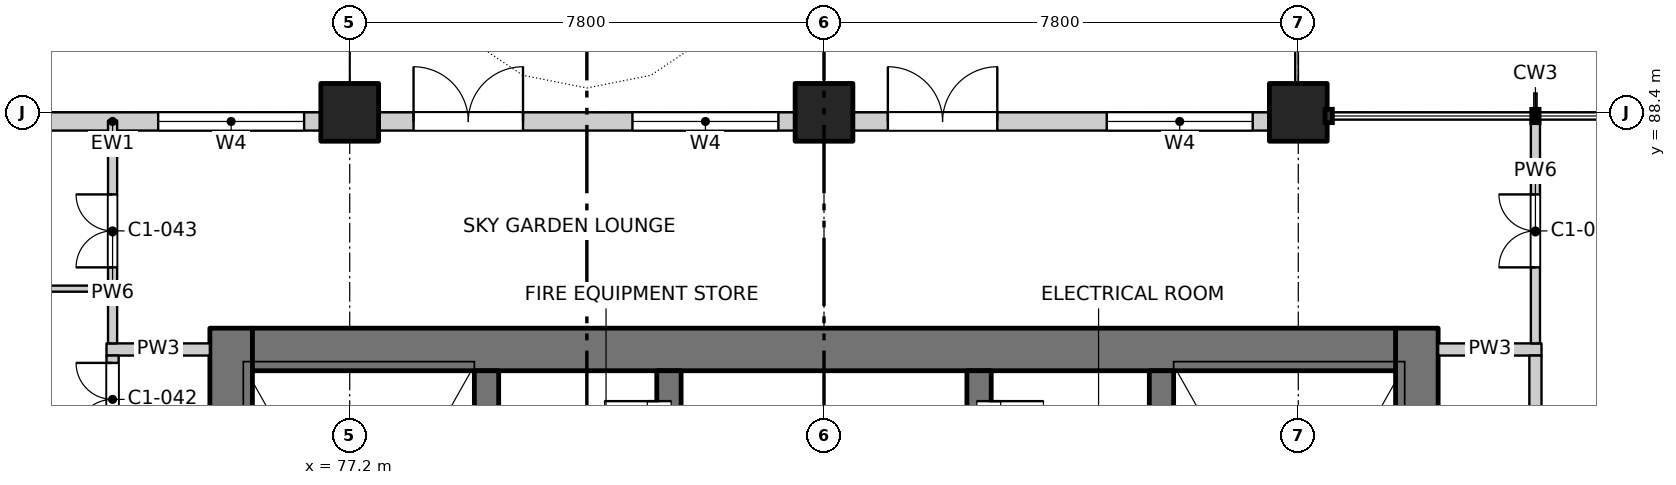
"""IFC4 building model, lengths in metres.
Left out: names, types, materials, properties, quantities, classifications, styles, units other than length and angle.
Written with IfcOpenShell. Run it as: python <this file> out.ifc"""

import sys

from ifc_helpers import new_model, si_unit, direction, frame, frame_2d, origin, origin_2d, place, context, subcontext, project, spatial, rectangle, extrude, element, fill, save


model = new_model("IFC4")
c1 = context("Model", 3, precision=1e-05, world=origin(), true_north=direction((0.0, 1.0)))
c2 = subcontext(c1, "Body", "Model", "MODEL_VIEW")
j1 = project(units=[si_unit("LENGTHUNIT", "METRE"), si_unit("PLANEANGLEUNIT", "RADIAN")], contexts=[c1])
p1 = place(None, origin())
s1 = spatial("IfcSite", under=j1, at=p1, CompositionType="ELEMENT")
p2 = place(p1, origin())
s2 = spatial("IfcBuilding", under=s1, at=p2, CompositionType="ELEMENT")
p3 = place(p2, frame((0.0, 0.0, 71.6)))
s3 = spatial("IfcBuildingStorey", under=s2, at=p3, CompositionType="ELEMENT", Elevation=71.6)
for number, where, z_axis, x_axis in (
    (1, (77.2, 88.4, -0.25), (0.0, 0.0, 1.0), (1.0, 0.0, 0.0)),
    (2, (85.0, 88.4, -0.25), (0.0, 0.0, 1.0), (1.0, 0.0, 0.0)),
    (3, (92.8, 88.4, -0.25), (0.0, 0.0, 1.0), (1.0, 0.0, 0.0)),
):
    element("IfcColumn", number, at=place(p3, frame(where, z_axis=z_axis, x_axis=x_axis)), inside=s3, PredefinedType="COLUMN", context=c2, shape_type="SweptSolid", body=[
        extrude(rectangle(XDim=0.95, YDim=0.95, at=origin_2d()), origin(), (0.0, 0.0, 1.0), 3.4),
    ])
p4 = place(p3, frame((75.25, 77.3, -0.25), z_axis=(0.0, 0.0, 1.0), x_axis=(0.0, 1.0, 0.0)))
e4 = element("IfcWall", 4, at=p4, inside=s3, PredefinedType="SOLIDWALL", context=c2, shape_type="SweptSolid", body=[
    extrude(rectangle(XDim=7.55, YDim=0.7, at=frame_2d((3.775, 0.0))), origin(), (0.0, 0.0, 1.0), 3.4),
])
p5 = place(p4, frame((0.3, 0.0, 0.25)))
e5 = element("IfcOpeningElement", 5, at=p5, cuts=e4, PredefinedType="OPENING", context=c2, shape_type="SweptSolid", body=[
    extrude(rectangle(XDim=1.2, YDim=2.1, at=frame_2d((0.6, 1.05))), frame((0.0, 0.36, 0.0), z_axis=(0.0, -1.0, 0.0), x_axis=(1.0, 0.0, 0.0)), (0.0, 0.0, 1.0), 0.72),
])
p6 = place(p3, frame((94.75, 77.3, -0.25), z_axis=(0.0, 0.0, 1.0), x_axis=(0.0, 1.0, 0.0)))
e6 = element("IfcWall", 6, at=p6, inside=s3, PredefinedType="SOLIDWALL", context=c2, shape_type="SweptSolid", body=[
    extrude(rectangle(XDim=7.55, YDim=0.7, at=frame_2d((3.775, 0.0))), origin(), (0.0, 0.0, 1.0), 3.4),
])
p7 = place(p6, frame((0.3, 0.0, 0.25)))
e7 = element("IfcOpeningElement", 7, at=p7, cuts=e6, PredefinedType="OPENING", context=c2, shape_type="SweptSolid", body=[
    extrude(rectangle(XDim=1.2, YDim=2.1, at=frame_2d((0.6, 1.05))), frame((0.0, 0.36, 0.0), z_axis=(0.0, -1.0, 0.0), x_axis=(1.0, 0.0, 0.0)), (0.0, 0.0, 1.0), 0.72),
])
p8 = place(p3, frame((75.6, 84.5, -0.25), z_axis=(0.0, 0.0, 1.0), x_axis=(1.0, 0.0, 0.0)))
e8 = element("IfcWall", 8, at=p8, inside=s3, PredefinedType="SOLIDWALL", context=c2, shape_type="SweptSolid", body=[
    extrude(rectangle(XDim=18.8, YDim=0.7, at=frame_2d((9.4, 0.0))), origin(), (0.0, 0.0, 1.0), 3.4),
])
for number, where, z_axis, x_axis in (
    (9, (79.45, 77.3, -0.25), (0.0, 0.0, 1.0), (0.0, 1.0, 0.0)),
    (10, (90.55, 77.3, -0.25), (0.0, 0.0, 1.0), (0.0, 1.0, 0.0)),
):
    element("IfcWall", number, at=place(p3, frame(where, z_axis=z_axis, x_axis=x_axis)), inside=s3, PredefinedType="SOLIDWALL", context=c2, shape_type="SweptSolid", body=[
        extrude(rectangle(XDim=6.85, YDim=0.4, at=frame_2d((3.425, 0.0))), origin(), (0.0, 0.0, 1.0), 3.4),
    ])
p9 = place(p3, frame((82.45, 82.1, -0.25), z_axis=(0.0, 0.0, 1.0), x_axis=(0.0, 1.0, 0.0)))
e11 = element("IfcWall", 11, at=p9, inside=s3, PredefinedType="SOLIDWALL", context=c2, shape_type="SweptSolid", body=[
    extrude(rectangle(XDim=2.05, YDim=0.4, at=frame_2d((1.025, 0.0))), origin(), (0.0, 0.0, 1.0), 3.4),
])
p10 = place(p9, frame((0.65, 0.0, 0.25)))
e12 = element("IfcOpeningElement", 12, at=p10, cuts=e11, PredefinedType="OPENING", context=c2, shape_type="SweptSolid", body=[
    extrude(rectangle(XDim=0.9, YDim=2.1, at=frame_2d((0.45, 1.05))), frame((0.0, 0.21, 0.0), z_axis=(0.0, -1.0, 0.0), x_axis=(1.0, 0.0, 0.0)), (0.0, 0.0, 1.0), 0.42),
])
p11 = place(p3, frame((87.55, 82.1, -0.25), z_axis=(0.0, 0.0, 1.0), x_axis=(0.0, 1.0, 0.0)))
e13 = element("IfcWall", 13, at=p11, inside=s3, PredefinedType="SOLIDWALL", context=c2, shape_type="SweptSolid", body=[
    extrude(rectangle(XDim=2.05, YDim=0.4, at=frame_2d((1.025, 0.0))), origin(), (0.0, 0.0, 1.0), 3.4),
])
p12 = place(p11, frame((0.65, 0.0, 0.25)))
e14 = element("IfcOpeningElement", 14, at=p12, cuts=e13, PredefinedType="OPENING", context=c2, shape_type="SweptSolid", body=[
    extrude(rectangle(XDim=0.9, YDim=2.1, at=frame_2d((0.45, 1.05))), frame((0.0, 0.21, 0.0), z_axis=(0.0, -1.0, 0.0), x_axis=(1.0, 0.0, 0.0)), (0.0, 0.0, 1.0), 0.42),
])
p13 = place(p3, frame((69.875, 88.25, 0.0), z_axis=(0.0, 0.0, 1.0), x_axis=(1.0, 0.0, 0.0)))
e15 = element("IfcWall", 15, at=p13, inside=s3, PredefinedType="SOLIDWALL", context=c2, shape_type="SweptSolid", body=[
    extrude(rectangle(XDim=6.85, YDim=0.3, at=frame_2d((3.425, 0.0))), origin(), (0.0, 0.0, 1.0), 2.7),
])
p14 = place(p13, frame((0.575, 0.0, 0.0)))
e16 = element("IfcOpeningElement", 16, at=p14, cuts=e15, PredefinedType="OPENING", context=c2, shape_type="SweptSolid", body=[
    extrude(rectangle(XDim=1.8, YDim=2.4, at=frame_2d((0.9, 1.2))), frame((0.0, 0.16, 0.0), z_axis=(0.0, -1.0, 0.0), x_axis=(1.0, 0.0, 0.0)), (0.0, 0.0, 1.0), 0.32),
])
p15 = place(p13, frame((4.175, 0.0, 0.6)))
e17 = element("IfcOpeningElement", 17, at=p15, cuts=e15, PredefinedType="OPENING", context=c2, shape_type="SweptSolid", body=[
    extrude(rectangle(XDim=2.4, YDim=2.1, at=frame_2d((1.2, 1.05))), frame((0.0, 0.16, 0.0), z_axis=(0.0, -1.0, 0.0), x_axis=(1.0, 0.0, 0.0)), (0.0, 0.0, 1.0), 0.32),
])
p16 = place(p3, frame((77.675, 88.25, 0.0), z_axis=(0.0, 0.0, 1.0), x_axis=(1.0, 0.0, 0.0)))
e18 = element("IfcWall", 18, at=p16, inside=s3, PredefinedType="SOLIDWALL", context=c2, shape_type="SweptSolid", body=[
    extrude(rectangle(XDim=6.85, YDim=0.3, at=frame_2d((3.425, 0.0))), origin(), (0.0, 0.0, 1.0), 2.7),
])
p17 = place(p16, frame((0.575, 0.0, 0.0)))
e19 = element("IfcOpeningElement", 19, at=p17, cuts=e18, PredefinedType="OPENING", context=c2, shape_type="SweptSolid", body=[
    extrude(rectangle(XDim=1.8, YDim=2.4, at=frame_2d((0.9, 1.2))), frame((0.0, 0.16, 0.0), z_axis=(0.0, -1.0, 0.0), x_axis=(1.0, 0.0, 0.0)), (0.0, 0.0, 1.0), 0.32),
])
p18 = place(p16, frame((4.175, 0.0, 0.6)))
e20 = element("IfcOpeningElement", 20, at=p18, cuts=e18, PredefinedType="OPENING", context=c2, shape_type="SweptSolid", body=[
    extrude(rectangle(XDim=2.4, YDim=2.1, at=frame_2d((1.2, 1.05))), frame((0.0, 0.16, 0.0), z_axis=(0.0, -1.0, 0.0), x_axis=(1.0, 0.0, 0.0)), (0.0, 0.0, 1.0), 0.32),
])
p19 = place(p3, frame((85.475, 88.25, 0.0), z_axis=(0.0, 0.0, 1.0), x_axis=(1.0, 0.0, 0.0)))
e21 = element("IfcWall", 21, at=p19, inside=s3, PredefinedType="SOLIDWALL", context=c2, shape_type="SweptSolid", body=[
    extrude(rectangle(XDim=6.85, YDim=0.3, at=frame_2d((3.425, 0.0))), origin(), (0.0, 0.0, 1.0), 2.7),
])
p20 = place(p19, frame((0.575, 0.0, 0.0)))
e22 = element("IfcOpeningElement", 22, at=p20, cuts=e21, PredefinedType="OPENING", context=c2, shape_type="SweptSolid", body=[
    extrude(rectangle(XDim=1.8, YDim=2.4, at=frame_2d((0.9, 1.2))), frame((0.0, 0.16, 0.0), z_axis=(0.0, -1.0, 0.0), x_axis=(1.0, 0.0, 0.0)), (0.0, 0.0, 1.0), 0.32),
])
p21 = place(p19, frame((4.175, 0.0, 0.6)))
e23 = element("IfcOpeningElement", 23, at=p21, cuts=e21, PredefinedType="OPENING", context=c2, shape_type="SweptSolid", body=[
    extrude(rectangle(XDim=2.4, YDim=2.1, at=frame_2d((1.2, 1.05))), frame((0.0, 0.16, 0.0), z_axis=(0.0, -1.0, 0.0), x_axis=(1.0, 0.0, 0.0)), (0.0, 0.0, 1.0), 0.32),
])
for number, where, z_axis, x_axis in (
    (24, (73.2, 84.5, 0.0), (0.0, 0.0, 1.0), (1.0, 0.0, 0.0)),
    (25, (95.1, 84.5, 0.0), (0.0, 0.0, 1.0), (1.0, 0.0, 0.0)),
):
    element("IfcWall", number, at=place(p3, frame(where, z_axis=z_axis, x_axis=x_axis)), inside=s3, PredefinedType="PARTITIONING", context=c2, shape_type="SweptSolid", body=[
        extrude(rectangle(XDim=1.7, YDim=0.2, at=frame_2d((0.85, 0.0))), origin(), (0.0, 0.0, 1.0), 3.15),
    ])
p22 = place(p3, frame((62.51, 85.5, 0.0), z_axis=(0.0, 0.0, 1.0), x_axis=(1.0, 0.0, 0.0)))
e26 = element("IfcWall", 26, at=p22, inside=s3, PredefinedType="PARTITIONING", context=c2, shape_type="SweptSolid", body=[
    extrude(rectangle(XDim=10.865, YDim=0.1, at=frame_2d((5.433, 0.0))), origin(), (0.0, 0.0, 1.0), 3.15),
])
p23 = place(p3, frame((73.3, 49.5, 0.0), z_axis=(0.0, 0.0, 1.0), x_axis=(0.0, 1.0, 0.0)))
e27 = element("IfcWall", 27, at=p23, inside=s3, PredefinedType="PARTITIONING", context=c2, shape_type="SweptSolid", body=[
    extrude(rectangle(XDim=34.9, YDim=0.2, at=frame_2d((17.45, 0.0))), origin(), (0.0, 0.0, 1.0), 3.15),
])
p24 = place(p23, frame((6.2, 0.0, 0.0)))
e28 = element("IfcOpeningElement", 28, at=p24, cuts=e27, PredefinedType="OPENING", context=c2, shape_type="SweptSolid", body=[
    extrude(rectangle(XDim=1.2, YDim=2.1, at=frame_2d((0.6, 1.05))), frame((0.0, 0.11, 0.0), z_axis=(0.0, -1.0, 0.0), x_axis=(1.0, 0.0, 0.0)), (0.0, 0.0, 1.0), 0.22),
])
p25 = place(p23, frame((9.05, 0.0, 0.0)))
e29 = element("IfcOpeningElement", 29, at=p25, cuts=e27, PredefinedType="OPENING", context=c2, shape_type="SweptSolid", body=[
    extrude(rectangle(XDim=1.2, YDim=2.1, at=frame_2d((0.6, 1.05))), frame((0.0, 0.11, 0.0), z_axis=(0.0, -1.0, 0.0), x_axis=(1.0, 0.0, 0.0)), (0.0, 0.0, 1.0), 0.22),
])
p26 = place(p23, frame((24.65, 0.0, 0.0)))
e30 = element("IfcOpeningElement", 30, at=p26, cuts=e27, PredefinedType="OPENING", context=c2, shape_type="SweptSolid", body=[
    extrude(rectangle(XDim=1.2, YDim=2.1, at=frame_2d((0.6, 1.05))), frame((0.0, 0.11, 0.0), z_axis=(0.0, -1.0, 0.0), x_axis=(1.0, 0.0, 0.0)), (0.0, 0.0, 1.0), 0.22),
])
p27 = place(p23, frame((33.579, 0.0, 0.0)))
e31 = element("IfcOpeningElement", 31, at=p27, cuts=e27, PredefinedType="OPENING", context=c2, shape_type="SweptSolid", body=[
    extrude(rectangle(XDim=1.2, YDim=2.1, at=frame_2d((0.6, 1.05))), frame((0.0, 0.11, 0.0), z_axis=(0.0, -1.0, 0.0), x_axis=(1.0, 0.0, 0.0)), (0.0, 0.0, 1.0), 0.22),
])
p28 = place(p3, frame((73.3, 84.6, 0.0), z_axis=(0.0, 0.0, 1.0), x_axis=(0.0, 1.0, 0.0)))
e32 = element("IfcWall", 32, at=p28, inside=s3, PredefinedType="PARTITIONING", context=c2, shape_type="SweptSolid", body=[
    extrude(rectangle(XDim=3.665, YDim=0.15, at=frame_2d((1.833, 0.0))), origin(), (0.0, 0.0, 1.0), 3.15),
])
p29 = place(p28, frame((1.25, 0.0, 0.0)))
e33 = element("IfcOpeningElement", 33, at=p29, cuts=e32, PredefinedType="OPENING", context=c2, shape_type="SweptSolid", body=[
    extrude(rectangle(XDim=1.2, YDim=2.1, at=frame_2d((0.6, 1.05))), frame((0.0, 0.085, 0.0), z_axis=(0.0, -1.0, 0.0), x_axis=(1.0, 0.0, 0.0)), (0.0, 0.0, 1.0), 0.17),
])
p30 = place(p3, frame((96.7, 49.5, 0.0), z_axis=(0.0, 0.0, 1.0), x_axis=(0.0, 1.0, 0.0)))
e34 = element("IfcWall", 34, at=p30, inside=s3, PredefinedType="PARTITIONING", context=c2, shape_type="SweptSolid", body=[
    extrude(rectangle(XDim=34.9, YDim=0.2, at=frame_2d((17.45, 0.0))), origin(), (0.0, 0.0, 1.0), 3.15),
])
p31 = place(p30, frame((6.2, 0.0, 0.0)))
e35 = element("IfcOpeningElement", 35, at=p31, cuts=e34, PredefinedType="OPENING", context=c2, shape_type="SweptSolid", body=[
    extrude(rectangle(XDim=1.2, YDim=2.1, at=frame_2d((0.6, 1.05))), frame((0.0, 0.11, 0.0), z_axis=(0.0, -1.0, 0.0), x_axis=(1.0, 0.0, 0.0)), (0.0, 0.0, 1.0), 0.22),
])
p32 = place(p30, frame((12.95, 0.0, 0.0)))
e36 = element("IfcOpeningElement", 36, at=p32, cuts=e34, PredefinedType="OPENING", context=c2, shape_type="SweptSolid", body=[
    extrude(rectangle(XDim=1.2, YDim=2.1, at=frame_2d((0.6, 1.05))), frame((0.0, 0.11, 0.0), z_axis=(0.0, -1.0, 0.0), x_axis=(1.0, 0.0, 0.0)), (0.0, 0.0, 1.0), 0.22),
])
p33 = place(p30, frame((20.75, 0.0, 0.0)))
e37 = element("IfcOpeningElement", 37, at=p33, cuts=e34, PredefinedType="OPENING", context=c2, shape_type="SweptSolid", body=[
    extrude(rectangle(XDim=1.2, YDim=2.1, at=frame_2d((0.6, 1.05))), frame((0.0, 0.11, 0.0), z_axis=(0.0, -1.0, 0.0), x_axis=(1.0, 0.0, 0.0)), (0.0, 0.0, 1.0), 0.22),
])
p34 = place(p30, frame((28.55, 0.0, 0.0)))
e38 = element("IfcOpeningElement", 38, at=p34, cuts=e34, PredefinedType="OPENING", context=c2, shape_type="SweptSolid", body=[
    extrude(rectangle(XDim=1.2, YDim=2.1, at=frame_2d((0.6, 1.05))), frame((0.0, 0.11, 0.0), z_axis=(0.0, -1.0, 0.0), x_axis=(1.0, 0.0, 0.0)), (0.0, 0.0, 1.0), 0.22),
])
p35 = place(p3, frame((96.7, 84.6, 0.0), z_axis=(0.0, 0.0, 1.0), x_axis=(0.0, 1.0, 0.0)))
e39 = element("IfcWall", 39, at=p35, inside=s3, PredefinedType="PARTITIONING", context=c2, shape_type="SweptSolid", body=[
    extrude(rectangle(XDim=3.665, YDim=0.15, at=frame_2d((1.833, 0.0))), origin(), (0.0, 0.0, 1.0), 3.15),
])
p36 = place(p35, frame((1.25, 0.0, 0.0)))
e40 = element("IfcOpeningElement", 40, at=p36, cuts=e39, PredefinedType="OPENING", context=c2, shape_type="SweptSolid", body=[
    extrude(rectangle(XDim=1.2, YDim=2.1, at=frame_2d((0.6, 1.05))), frame((0.0, 0.085, 0.0), z_axis=(0.0, -1.0, 0.0), x_axis=(1.0, 0.0, 0.0)), (0.0, 0.0, 1.0), 0.17),
])
p37 = place(p15, origin())
e41 = element("IfcWindow", 41, at=p37, inside=s3, PartitioningType="SINGLE_PANEL", PredefinedType="WINDOW", context=c2, shape_type="SweptSolid", body=[
    extrude(rectangle(XDim=2.4, YDim=2.1, at=frame_2d((1.2, 1.05))), frame((0.0, 0.03, 0.0), z_axis=(0.0, -1.0, 0.0), x_axis=(1.0, 0.0, 0.0)), (0.0, 0.0, 1.0), 0.06),
])
fill(e17, e41)
p38 = place(p17, origin())
e42 = element("IfcDoor", 42, at=p38, inside=s3, OperationType="DOUBLE_DOOR_SINGLE_SWING", PredefinedType="DOOR", context=c2, shape_type="SweptSolid", body=[
    extrude(rectangle(XDim=1.8, YDim=2.4, at=frame_2d((0.9, 1.2))), frame((0.0, 0.025, 0.0), z_axis=(0.0, -1.0, 0.0), x_axis=(1.0, 0.0, 0.0)), (0.0, 0.0, 1.0), 0.05),
])
fill(e19, e42)
p39 = place(p18, origin())
e43 = element("IfcWindow", 43, at=p39, inside=s3, PartitioningType="SINGLE_PANEL", PredefinedType="WINDOW", context=c2, shape_type="SweptSolid", body=[
    extrude(rectangle(XDim=2.4, YDim=2.1, at=frame_2d((1.2, 1.05))), frame((0.0, 0.03, 0.0), z_axis=(0.0, -1.0, 0.0), x_axis=(1.0, 0.0, 0.0)), (0.0, 0.0, 1.0), 0.06),
])
fill(e20, e43)
p40 = place(p20, origin())
e44 = element("IfcDoor", 44, at=p40, inside=s3, OperationType="DOUBLE_DOOR_SINGLE_SWING", PredefinedType="DOOR", context=c2, shape_type="SweptSolid", body=[
    extrude(rectangle(XDim=1.8, YDim=2.4, at=frame_2d((0.9, 1.2))), frame((0.0, 0.025, 0.0), z_axis=(0.0, -1.0, 0.0), x_axis=(1.0, 0.0, 0.0)), (0.0, 0.0, 1.0), 0.05),
])
fill(e22, e44)
p41 = place(p21, origin())
e45 = element("IfcWindow", 45, at=p41, inside=s3, PartitioningType="SINGLE_PANEL", PredefinedType="WINDOW", context=c2, shape_type="SweptSolid", body=[
    extrude(rectangle(XDim=2.4, YDim=2.1, at=frame_2d((1.2, 1.05))), frame((0.0, 0.03, 0.0), z_axis=(0.0, -1.0, 0.0), x_axis=(1.0, 0.0, 0.0)), (0.0, 0.0, 1.0), 0.06),
])
fill(e23, e45)
p42 = place(p10, origin())
e46 = element("IfcDoor", 46, at=p42, inside=s3, OperationType="SINGLE_SWING_RIGHT", PredefinedType="DOOR", context=c2, shape_type="SweptSolid", body=[
    extrude(rectangle(XDim=0.9, YDim=2.1, at=frame_2d((0.45, 1.05))), frame((0.0, 0.185, 0.0), z_axis=(0.0, -1.0, 0.0), x_axis=(1.0, 0.0, 0.0)), (0.0, 0.0, 1.0), 0.05),
])
fill(e12, e46)
p43 = place(p12, origin())
e47 = element("IfcDoor", 47, at=p43, inside=s3, OperationType="SINGLE_SWING_LEFT", PredefinedType="DOOR", context=c2, shape_type="SweptSolid", body=[
    extrude(rectangle(XDim=0.9, YDim=2.1, at=frame_2d((0.45, 1.05))), frame((0.0, -0.135, 0.0), z_axis=(0.0, -1.0, 0.0), x_axis=(1.0, 0.0, 0.0)), (0.0, 0.0, 1.0), 0.05),
])
fill(e14, e47)
p44 = place(p27, origin())
e48 = element("IfcDoor", 48, at=p44, inside=s3, OperationType="DOUBLE_DOOR_SINGLE_SWING", PredefinedType="DOOR", context=c2, shape_type="SweptSolid", body=[
    extrude(rectangle(XDim=1.2, YDim=2.1, at=frame_2d((0.6, 1.05))), frame((0.0, 0.025, 0.0), z_axis=(0.0, -1.0, 0.0), x_axis=(1.0, 0.0, 0.0)), (0.0, 0.0, 1.0), 0.05),
])
fill(e31, e48)
p45 = place(p29, origin())
e49 = element("IfcDoor", 49, at=p45, inside=s3, OperationType="DOUBLE_DOOR_SINGLE_SWING", PredefinedType="DOOR", context=c2, shape_type="SweptSolid", body=[
    extrude(rectangle(XDim=1.2, YDim=2.1, at=frame_2d((0.6, 1.05))), frame((0.0, 0.025, 0.0), z_axis=(0.0, -1.0, 0.0), x_axis=(1.0, 0.0, 0.0)), (0.0, 0.0, 1.0), 0.05),
])
fill(e33, e49)
p46 = place(p36, origin())
e50 = element("IfcDoor", 50, at=p46, inside=s3, OperationType="DOUBLE_DOOR_SINGLE_SWING", PredefinedType="DOOR", context=c2, shape_type="SweptSolid", body=[
    extrude(rectangle(XDim=1.2, YDim=2.1, at=frame_2d((0.6, 1.05))), frame((0.0, 0.025, 0.0), z_axis=(0.0, -1.0, 0.0), x_axis=(1.0, 0.0, 0.0)), (0.0, 0.0, 1.0), 0.05),
])
fill(e40, e50)
save(model, sys.argv[1])
